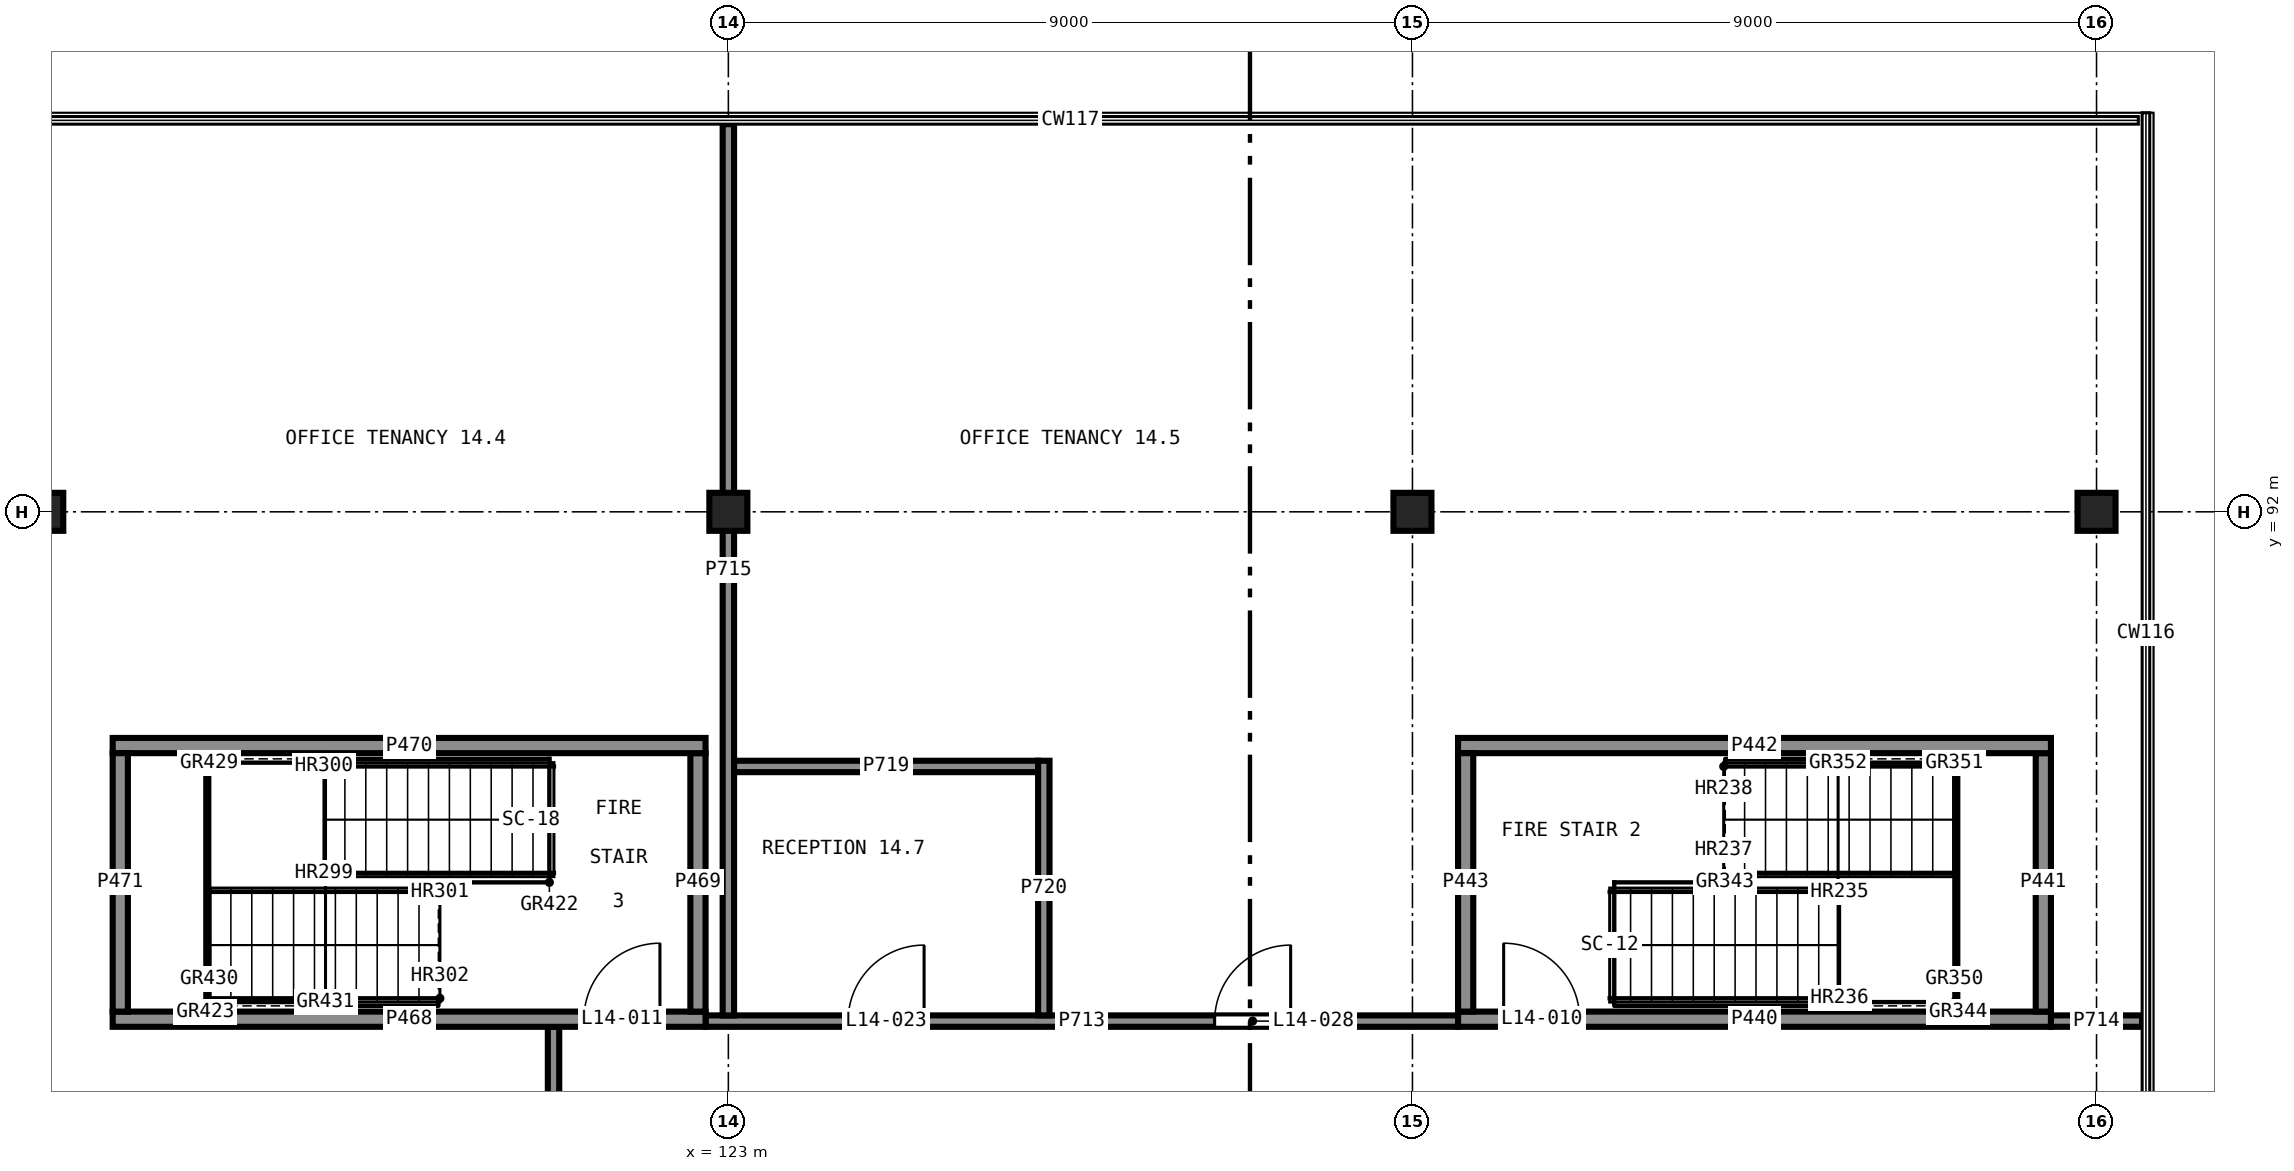
"""IFC4 building model, lengths in metres.
Left out: names, types, materials, properties, quantities, classifications, styles, units other than length and angle.
Written with IfcOpenShell. Run it as: python <this file> out.ifc"""

import sys

from ifc_helpers import new_model, si_unit, direction, frame, frame_2d, origin, origin_2d, place, context, subcontext, project, spatial, rectangle, extrude, element, fill, save


model = new_model("IFC4")
c1 = context("Model", 3, precision=1e-05, world=origin(), true_north=direction((0.0, 1.0)))
c2 = subcontext(c1, "Body", "Model", "MODEL_VIEW")
j1 = project(units=[si_unit("LENGTHUNIT", "METRE"), si_unit("PLANEANGLEUNIT", "RADIAN")], contexts=[c1])
p1 = place(None, origin())
s1 = spatial("IfcSite", under=j1, at=p1, CompositionType="ELEMENT")
p2 = place(p1, origin())
s2 = spatial("IfcBuilding", under=s1, at=p2, CompositionType="ELEMENT")
p3 = place(p2, frame((0.0, 0.0, 57.5)))
s3 = spatial("IfcBuildingStorey", under=s2, at=p3, CompositionType="ELEMENT", Elevation=57.5)
for number, where, z_axis, x_axis in (
    (1, (114.0, 92.0, 0.0), (0.0, 0.0, 1.0), (1.0, 0.0, 0.0)),
    (2, (123.0, 92.0, 0.0), (0.0, 0.0, 1.0), (1.0, 0.0, 0.0)),
    (3, (132.0, 92.0, 0.0), (0.0, 0.0, 1.0), (1.0, 0.0, 0.0)),
    (4, (141.0, 92.0, 0.0), (0.0, 0.0, 1.0), (1.0, 0.0, 0.0)),
):
    element("IfcColumn", number, at=place(p3, frame(where, z_axis=z_axis, x_axis=x_axis)), inside=s3, PredefinedType="COLUMN", context=c2, shape_type="SweptSolid", body=[
        extrude(rectangle(XDim=0.5, YDim=0.5, at=origin_2d()), origin(), (0.0, 0.0, 1.0), 4.0),
    ])
p4 = place(p3, frame((132.6, 85.325, 0.0), z_axis=(0.0, 0.0, 1.0), x_axis=(1.0, 0.0, 0.0)))
e5 = element("IfcWall", 5, at=p4, inside=s3, PredefinedType="SHEAR", context=c2, shape_type="SweptSolid", body=[
    extrude(rectangle(XDim=7.8, YDim=0.2, at=frame_2d((3.9, 0.0))), origin(), (0.0, 0.0, 1.0), 3.75),
])
p5 = place(p4, frame((0.6, 0.0, 0.0)))
e6 = element("IfcOpeningElement", 6, at=p5, cuts=e5, PredefinedType="OPENING", context=c2, shape_type="SweptSolid", body=[
    extrude(rectangle(XDim=1.0, YDim=2.1, at=frame_2d((0.5, 1.05))), frame((0.0, 0.11, 0.0), z_axis=(0.0, -1.0, 0.0), x_axis=(1.0, 0.0, 0.0)), (0.0, 0.0, 1.0), 0.22),
])
p6 = place(p3, frame((140.3, 85.425, 0.0), z_axis=(0.0, 0.0, 1.0), x_axis=(0.0, 1.0, 0.0)))
e7 = element("IfcWall", 7, at=p6, inside=s3, PredefinedType="SHEAR", context=c2, shape_type="SweptSolid", body=[
    extrude(rectangle(XDim=3.4, YDim=0.2, at=frame_2d((1.7, 0.0))), origin(), (0.0, 0.0, 1.0), 3.75),
])
p7 = place(p3, frame((140.4, 88.925, 0.0), z_axis=(0.0, 0.0, 1.0), x_axis=(-1.0, 0.0, 0.0)))
e8 = element("IfcWall", 8, at=p7, inside=s3, PredefinedType="SHEAR", context=c2, shape_type="SweptSolid", body=[
    extrude(rectangle(XDim=7.8, YDim=0.2, at=frame_2d((3.9, 0.0))), origin(), (0.0, 0.0, 1.0), 3.75),
])
p8 = place(p3, frame((132.7, 88.825, 0.0), z_axis=(0.0, 0.0, 1.0), x_axis=(0.0, -1.0, 0.0)))
e9 = element("IfcWall", 9, at=p8, inside=s3, PredefinedType="SHEAR", context=c2, shape_type="SweptSolid", body=[
    extrude(rectangle(XDim=3.4, YDim=0.2, at=frame_2d((1.7, 0.0))), origin(), (0.0, 0.0, 1.0), 3.75),
])
p9 = place(p3, frame((114.9, 85.325, 0.0), z_axis=(0.0, 0.0, 1.0), x_axis=(1.0, 0.0, 0.0)))
e10 = element("IfcWall", 10, at=p9, inside=s3, PredefinedType="SHEAR", context=c2, shape_type="SweptSolid", body=[
    extrude(rectangle(XDim=7.8, YDim=0.2, at=frame_2d((3.9, 0.0))), origin(), (0.0, 0.0, 1.0), 3.75),
])
p10 = place(p9, frame((6.2, 0.0, 0.0)))
e11 = element("IfcOpeningElement", 11, at=p10, cuts=e10, PredefinedType="OPENING", context=c2, shape_type="SweptSolid", body=[
    extrude(rectangle(XDim=1.0, YDim=2.1, at=frame_2d((0.5, 1.05))), frame((0.0, 0.11, 0.0), z_axis=(0.0, -1.0, 0.0), x_axis=(1.0, 0.0, 0.0)), (0.0, 0.0, 1.0), 0.22),
])
p11 = place(p3, frame((122.6, 85.425, 0.0), z_axis=(0.0, 0.0, 1.0), x_axis=(0.0, 1.0, 0.0)))
e12 = element("IfcWall", 12, at=p11, inside=s3, PredefinedType="SHEAR", context=c2, shape_type="SweptSolid", body=[
    extrude(rectangle(XDim=3.4, YDim=0.2, at=frame_2d((1.7, 0.0))), origin(), (0.0, 0.0, 1.0), 3.75),
])
p12 = place(p3, frame((122.7, 88.925, 0.0), z_axis=(0.0, 0.0, 1.0), x_axis=(-1.0, 0.0, 0.0)))
e13 = element("IfcWall", 13, at=p12, inside=s3, PredefinedType="SHEAR", context=c2, shape_type="SweptSolid", body=[
    extrude(rectangle(XDim=7.8, YDim=0.2, at=frame_2d((3.9, 0.0))), origin(), (0.0, 0.0, 1.0), 3.75),
])
p13 = place(p3, frame((115.0, 88.825, 0.0), z_axis=(0.0, 0.0, 1.0), x_axis=(0.0, -1.0, 0.0)))
e14 = element("IfcWall", 14, at=p13, inside=s3, PredefinedType="SHEAR", context=c2, shape_type="SweptSolid", body=[
    extrude(rectangle(XDim=3.4, YDim=0.2, at=frame_2d((1.7, 0.0))), origin(), (0.0, 0.0, 1.0), 3.75),
])
p14 = place(p3, frame((120.7, 64.4, 0.0), z_axis=(0.0, 0.0, 1.0), x_axis=(0.0, 1.0, 0.0)))
e15 = element("IfcWall", 15, at=p14, inside=s3, PredefinedType="PARTITIONING", context=c2, shape_type="SweptSolid", body=[
    extrude(rectangle(XDim=20.825, YDim=0.15, at=frame_2d((10.413, 0.0))), origin(), (0.0, 0.0, 1.0), 3.75),
])
p15 = place(p14, frame((1.375, 0.0, 0.0)))
e16 = element("IfcOpeningElement", 16, at=p15, cuts=e15, PredefinedType="OPENING", context=c2, shape_type="SweptSolid", body=[
    extrude(rectangle(XDim=1.0, YDim=2.1, at=frame_2d((0.5, 1.05))), frame((0.0, 0.085, 0.0), z_axis=(0.0, -1.0, 0.0), x_axis=(1.0, 0.0, 0.0)), (0.0, 0.0, 1.0), 0.17),
])
p16 = place(p14, frame((8.438, 0.0, 0.0)))
e17 = element("IfcOpeningElement", 17, at=p16, cuts=e15, PredefinedType="OPENING", context=c2, shape_type="SweptSolid", body=[
    extrude(rectangle(XDim=1.0, YDim=2.1, at=frame_2d((0.5, 1.05))), frame((0.0, 0.085, 0.0), z_axis=(0.0, -1.0, 0.0), x_axis=(1.0, 0.0, 0.0)), (0.0, 0.0, 1.0), 0.17),
])
p17 = place(p14, frame((16.985, 0.0, 0.0)))
e18 = element("IfcOpeningElement", 18, at=p17, cuts=e15, PredefinedType="OPENING", context=c2, shape_type="SweptSolid", body=[
    extrude(rectangle(XDim=1.0, YDim=2.1, at=frame_2d((0.5, 1.05))), frame((0.0, 0.085, 0.0), z_axis=(0.0, -1.0, 0.0), x_axis=(1.0, 0.0, 0.0)), (0.0, 0.0, 1.0), 0.17),
])
p18 = place(p3, frame((122.7, 85.3, 0.0), z_axis=(0.0, 0.0, 1.0), x_axis=(1.0, 0.0, 0.0)))
e19 = element("IfcWall", 19, at=p18, inside=s3, PredefinedType="PARTITIONING", context=c2, shape_type="SweptSolid", body=[
    extrude(rectangle(XDim=9.9, YDim=0.15, at=frame_2d((4.95, 0.0))), origin(), (0.0, 0.0, 1.0), 3.75),
])
p19 = place(p18, frame((1.875, 0.0, 0.0)))
e20 = element("IfcOpeningElement", 20, at=p19, cuts=e19, PredefinedType="OPENING", context=c2, shape_type="SweptSolid", body=[
    extrude(rectangle(XDim=1.0, YDim=2.1, at=frame_2d((0.5, 1.05))), frame((0.0, 0.085, 0.0), z_axis=(0.0, -1.0, 0.0), x_axis=(1.0, 0.0, 0.0)), (0.0, 0.0, 1.0), 0.17),
])
p20 = place(p18, frame((6.698, 0.0, 0.0)))
e21 = element("IfcOpeningElement", 21, at=p20, cuts=e19, PredefinedType="OPENING", context=c2, shape_type="SweptSolid", body=[
    extrude(rectangle(XDim=1.0, YDim=2.1, at=frame_2d((0.5, 1.05))), frame((0.0, 0.085, 0.0), z_axis=(0.0, -1.0, 0.0), x_axis=(1.0, 0.0, 0.0)), (0.0, 0.0, 1.0), 0.17),
])
p21 = place(p3, frame((140.4, 85.3, 0.0), z_axis=(0.0, 0.0, 1.0), x_axis=(1.0, 0.0, 0.0)))
e22 = element("IfcWall", 22, at=p21, inside=s3, PredefinedType="PARTITIONING", context=c2, shape_type="SweptSolid", body=[
    extrude(rectangle(XDim=1.2, YDim=0.15, at=frame_2d((0.6, 0.0))), origin(), (0.0, 0.0, 1.0), 3.75),
])
p22 = place(p3, frame((123.0, 85.374, 0.0), z_axis=(0.0, 0.0, 1.0), x_axis=(0.0, 1.0, 0.0)))
e23 = element("IfcWall", 23, at=p22, inside=s3, PredefinedType="PARTITIONING", context=c2, shape_type="SweptSolid", body=[
    extrude(rectangle(XDim=11.726, YDim=0.15, at=frame_2d((5.863, 0.0))), origin(), (0.0, 0.0, 1.0), 2.85),
])
p23 = place(p3, frame((123.075, 88.65, 0.0), z_axis=(0.0, 0.0, 1.0), x_axis=(1.0, 0.0, 0.0)))
e24 = element("IfcWall", 24, at=p23, inside=s3, PredefinedType="PARTITIONING", context=c2, shape_type="SweptSolid", body=[
    extrude(rectangle(XDim=4.0, YDim=0.15, at=frame_2d((2.0, 0.0))), origin(), (0.0, 0.0, 1.0), 3.75),
])
p24 = place(p3, frame((127.15, 85.375, 0.0), z_axis=(0.0, 0.0, 1.0), x_axis=(0.0, 1.0, 0.0)))
e25 = element("IfcWall", 25, at=p24, inside=s3, PredefinedType="PARTITIONING", context=c2, shape_type="SweptSolid", body=[
    extrude(rectangle(XDim=3.35, YDim=0.15, at=frame_2d((1.675, 0.0))), origin(), (0.0, 0.0, 1.0), 3.75),
])
p25 = place(p5, origin())
e26 = element("IfcDoor", 26, at=p25, inside=s3, OperationType="SINGLE_SWING_RIGHT", PredefinedType="DOOR", context=c2, shape_type="SweptSolid", body=[
    extrude(rectangle(XDim=1.0, YDim=2.1, at=frame_2d((0.5, 1.05))), frame((0.0, 0.025, 0.0), z_axis=(0.0, -1.0, 0.0), x_axis=(1.0, 0.0, 0.0)), (0.0, 0.0, 1.0), 0.05),
])
fill(e6, e26)
p26 = place(p10, origin())
e27 = element("IfcDoor", 27, at=p26, inside=s3, OperationType="SINGLE_SWING_LEFT", PredefinedType="DOOR", context=c2, shape_type="SweptSolid", body=[
    extrude(rectangle(XDim=1.0, YDim=2.1, at=frame_2d((0.5, 1.05))), frame((0.0, 0.025, 0.0), z_axis=(0.0, -1.0, 0.0), x_axis=(1.0, 0.0, 0.0)), (0.0, 0.0, 1.0), 0.05),
])
fill(e11, e27)
p27 = place(p19, origin())
e28 = element("IfcDoor", 28, at=p27, inside=s3, OperationType="SINGLE_SWING_LEFT", PredefinedType="DOOR", context=c2, shape_type="SweptSolid", body=[
    extrude(rectangle(XDim=1.0, YDim=2.1, at=frame_2d((0.5, 1.05))), frame((0.0, 0.025, 0.0), z_axis=(0.0, -1.0, 0.0), x_axis=(1.0, 0.0, 0.0)), (0.0, 0.0, 1.0), 0.05),
])
fill(e20, e28)
p28 = place(p20, origin())
e29 = element("IfcDoor", 29, at=p28, inside=s3, OperationType="SINGLE_SWING_LEFT", PredefinedType="DOOR", context=c2, shape_type="SweptSolid", body=[
    extrude(rectangle(XDim=1.0, YDim=2.1, at=frame_2d((0.5, 1.05))), frame((0.0, 0.025, 0.0), z_axis=(0.0, -1.0, 0.0), x_axis=(1.0, 0.0, 0.0)), (0.0, 0.0, 1.0), 0.05),
])
fill(e21, e29)
save(model, sys.argv[1])
